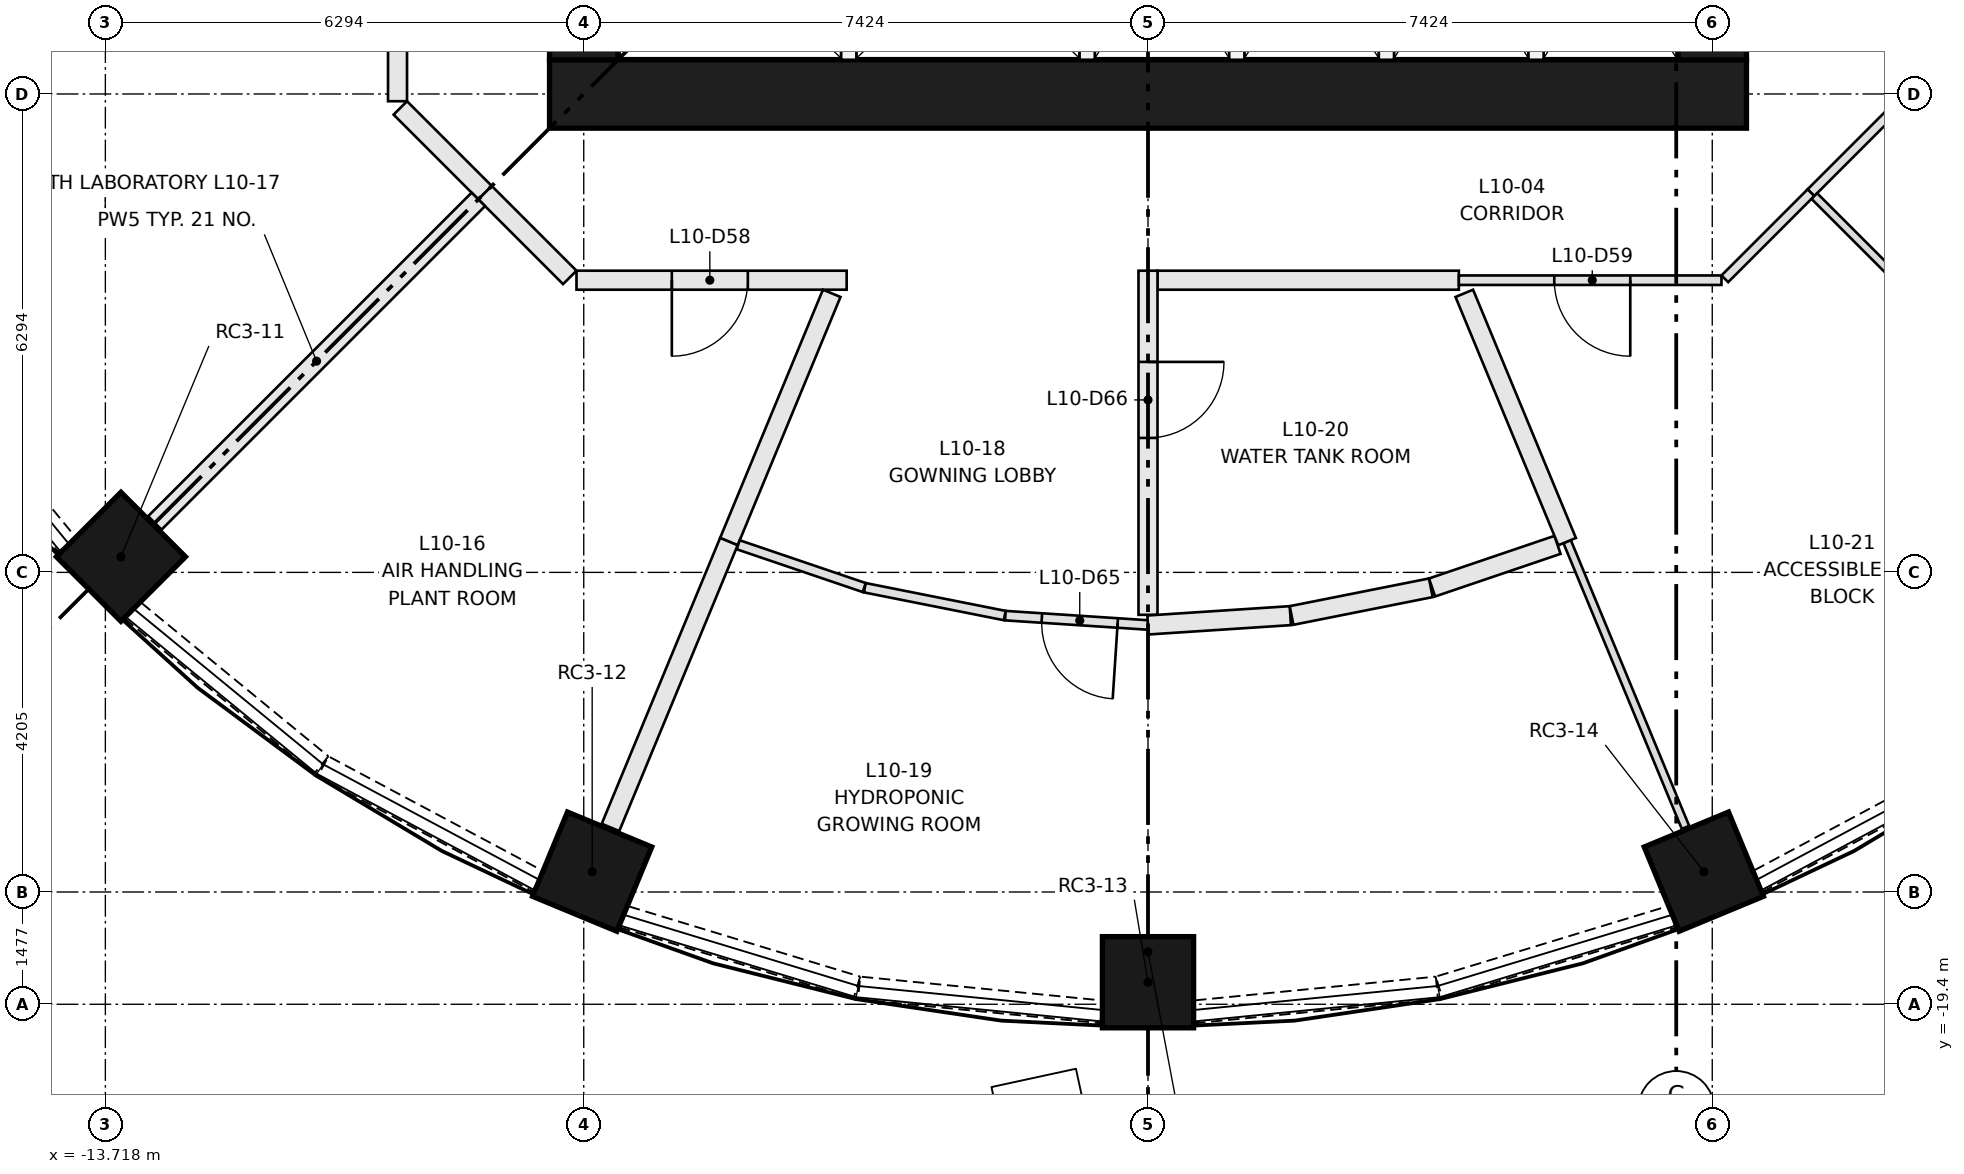
"""IFC4 building model, lengths in metres.
Left out: names, types, materials, properties, quantities, classifications, styles, units other than length and angle.
Written with IfcOpenShell. Run it as: python <this file> out.ifc"""

import sys

from ifc_helpers import new_model, si_unit, direction, frame, frame_2d, origin, origin_2d, place, context, subcontext, project, spatial, rectangle, extrude, element, fill, save


model = new_model("IFC4")
c1 = context("Model", 3, precision=1e-05, world=origin(), true_north=direction((0.0, 1.0)))
c2 = subcontext(c1, "Body", "Model", "MODEL_VIEW")
j1 = project(units=[si_unit("LENGTHUNIT", "METRE"), si_unit("PLANEANGLEUNIT", "RADIAN")], contexts=[c1])
p1 = place(None, origin())
s1 = spatial("IfcSite", under=j1, at=p1, CompositionType="ELEMENT")
p2 = place(p1, origin())
s2 = spatial("IfcBuilding", under=s1, at=p2, CompositionType="ELEMENT")
p3 = place(p2, frame((0.0, 0.0, 40.8)))
s3 = spatial("IfcBuildingStorey", under=s2, at=p3, CompositionType="ELEMENT", Elevation=40.8)
for number, where, z_axis, x_axis in (
    (1, (-13.513, -13.513, 0.0), (0.0, 0.0, 1.0), (-0.707, -0.707, 0.0)),
    (2, (-7.313, -17.655, 0.0), (0.0, 0.0, 1.0), (-0.383, -0.924, 0.0)),
    (3, (0.0, -19.11, 0.0), (0.0, 0.0, 1.0), (0.0, -1.0, 0.0)),
    (4, (7.313, -17.655, 0.0), (0.0, 0.0, 1.0), (0.383, -0.924, 0.0)),
):
    element("IfcColumn", number, at=place(p3, frame(where, z_axis=z_axis, x_axis=x_axis)), inside=s3, PredefinedType="COLUMN", context=c2, shape_type="SweptSolid", body=[
        extrude(rectangle(XDim=1.2, YDim=1.2, at=origin_2d()), origin(), (0.0, 0.0, 1.0), 3.65),
    ])
p4 = place(p3, frame((-7.874, -7.424, 0.0), z_axis=(0.0, 0.0, 1.0), x_axis=(1.0, 0.0, 0.0)))
e5 = element("IfcWall", 5, at=p4, inside=s3, PredefinedType="SHEAR", context=c2, shape_type="SweptSolid", body=[
    extrude(rectangle(XDim=15.748, YDim=0.9, at=frame_2d((7.874, 0.0))), origin(), (0.0, 0.0, 1.0), 3.65),
])
p5 = place(p3, frame((-7.424, -6.974, 0.0), z_axis=(0.0, 0.0, 1.0), x_axis=(0.0, 1.0, 0.0)))
e6 = element("IfcWall", 6, at=p5, inside=s3, PredefinedType="SHEAR", context=c2, shape_type="SweptSolid", body=[
    extrude(rectangle(XDim=13.948, YDim=0.9, at=frame_2d((6.974, 0.0))), origin(), (0.0, 0.0, 1.0), 3.65),
])
p6 = place(p5, frame((6.474, 0.0, 0.0)))
e7 = element("IfcOpeningElement", 7, at=p6, cuts=e6, PredefinedType="OPENING", context=c2, shape_type="SweptSolid", body=[
    extrude(rectangle(XDim=1.0, YDim=2.1, at=frame_2d((0.5, 1.05))), frame((0.0, 0.46, 0.0), z_axis=(0.0, -1.0, 0.0), x_axis=(1.0, 0.0, 0.0)), (0.0, 0.0, 1.0), 0.92),
])
p7 = place(p5, frame((3.35, 0.0, 0.0)))
e8 = element("IfcOpeningElement", 8, at=p7, cuts=e6, PredefinedType="OPENING", context=c2, shape_type="SweptSolid", body=[
    extrude(rectangle(XDim=1.8, YDim=2.1, at=frame_2d((0.9, 1.05))), frame((0.0, 0.46, 0.0), z_axis=(0.0, -1.0, 0.0), x_axis=(1.0, 0.0, 0.0)), (0.0, 0.0, 1.0), 0.92),
])
p8 = place(p5, frame((8.799, 0.0, 0.0)))
e9 = element("IfcOpeningElement", 9, at=p8, cuts=e6, PredefinedType="OPENING", context=c2, shape_type="SweptSolid", body=[
    extrude(rectangle(XDim=1.8, YDim=2.1, at=frame_2d((0.9, 1.05))), frame((0.0, 0.46, 0.0), z_axis=(0.0, -1.0, 0.0), x_axis=(1.0, 0.0, 0.0)), (0.0, 0.0, 1.0), 0.92),
])
p9 = place(p5, frame((11.974, 0.0, 0.0)))
e10 = element("IfcOpeningElement", 10, at=p9, cuts=e6, PredefinedType="OPENING", context=c2, shape_type="SweptSolid", body=[
    extrude(rectangle(XDim=1.0, YDim=2.1, at=frame_2d((0.5, 1.05))), frame((0.0, 0.46, 0.0), z_axis=(0.0, -1.0, 0.0), x_axis=(1.0, 0.0, 0.0)), (0.0, 0.0, 1.0), 0.92),
])
p10 = place(p3, frame((7.424, -6.974, 0.0), z_axis=(0.0, 0.0, 1.0), x_axis=(0.0, 1.0, 0.0)))
e11 = element("IfcWall", 11, at=p10, inside=s3, PredefinedType="SHEAR", context=c2, shape_type="SweptSolid", body=[
    extrude(rectangle(XDim=13.948, YDim=0.9, at=frame_2d((6.974, 0.0))), origin(), (0.0, 0.0, 1.0), 3.65),
])
p11 = place(p10, frame((6.474, 0.0, 0.0)))
e12 = element("IfcOpeningElement", 12, at=p11, cuts=e11, PredefinedType="OPENING", context=c2, shape_type="SweptSolid", body=[
    extrude(rectangle(XDim=1.0, YDim=2.1, at=frame_2d((0.5, 1.05))), frame((0.0, 0.46, 0.0), z_axis=(0.0, -1.0, 0.0), x_axis=(1.0, 0.0, 0.0)), (0.0, 0.0, 1.0), 0.92),
])
p12 = place(p10, frame((3.35, 0.0, 0.0)))
e13 = element("IfcOpeningElement", 13, at=p12, cuts=e11, PredefinedType="OPENING", context=c2, shape_type="SweptSolid", body=[
    extrude(rectangle(XDim=1.8, YDim=2.1, at=frame_2d((0.9, 1.05))), frame((0.0, 0.46, 0.0), z_axis=(0.0, -1.0, 0.0), x_axis=(1.0, 0.0, 0.0)), (0.0, 0.0, 1.0), 0.92),
])
p13 = place(p10, frame((8.799, 0.0, 0.0)))
e14 = element("IfcOpeningElement", 14, at=p13, cuts=e11, PredefinedType="OPENING", context=c2, shape_type="SweptSolid", body=[
    extrude(rectangle(XDim=1.8, YDim=2.1, at=frame_2d((0.9, 1.05))), frame((0.0, 0.46, 0.0), z_axis=(0.0, -1.0, 0.0), x_axis=(1.0, 0.0, 0.0)), (0.0, 0.0, 1.0), 0.92),
])
for number, where, z_axis, x_axis in (
    (15, (-3.937, -6.974, 0.0), (0.0, 0.0, 1.0), (0.0, 1.0, 0.0)),
    (16, (-0.8, -6.974, 0.0), (0.0, 0.0, 1.0), (0.0, 1.0, 0.0)),
    (17, (1.168, -6.974, 0.0), (0.0, 0.0, 1.0), (0.0, 1.0, 0.0)),
    (18, (3.137, -6.974, 0.0), (0.0, 0.0, 1.0), (0.0, 1.0, 0.0)),
    (19, (5.105, -6.974, 0.0), (0.0, 0.0, 1.0), (0.0, 1.0, 0.0)),
):
    element("IfcWall", number, at=place(p3, frame(where, z_axis=z_axis, x_axis=x_axis)), inside=s3, PredefinedType="PARTITIONING", context=c2, shape_type="SweptSolid", body=[
        extrude(rectangle(XDim=2.8, YDim=0.2, at=frame_2d((1.4, 0.0))), origin(), (0.0, 0.0, 1.0), 3.3),
    ])
for number, where, z_axis, x_axis in (
    (20, (-16.253, -10.879, 0.0), (0.0, 0.0, 1.0), (0.634, -0.773, 0.0)),
    (21, (-13.354, -14.222, 0.0), (0.0, 0.0, 1.0), (0.773, -0.634, 0.0)),
):
    element("IfcWall", number, at=place(p3, frame(where, z_axis=z_axis, x_axis=x_axis)), inside=s3, PredefinedType="SOLIDWALL", context=c2, shape_type="SweptSolid", body=[
        extrude(rectangle(XDim=3.202, YDim=0.3, at=frame_2d((1.601, 0.0))), origin(), (0.0, 0.0, 1.0), 0.9),
    ])
p14 = place(p3, frame((-10.854, -16.27, 0.0), z_axis=(0.0, 0.0, 1.0), x_axis=(0.881981372243, -0.471284265614, 0.0)))
e22 = element("IfcWall", 22, at=p14, inside=s3, PredefinedType="SOLIDWALL", context=c2, shape_type="SweptSolid", body=[
    extrude(rectangle(XDim=3.204, YDim=0.3, at=frame_2d((1.602, 0.0))), origin(), (0.0, 0.0, 1.0), 0.9),
])
p15 = place(p3, frame((-6.895, -18.25, 0.0), z_axis=(0.0, 0.0, 1.0), x_axis=(0.956883225512, -0.290472877795, 0.0)))
e23 = element("IfcWall", 23, at=p15, inside=s3, PredefinedType="SOLIDWALL", context=c2, shape_type="SweptSolid", body=[
    extrude(rectangle(XDim=3.202, YDim=0.3, at=frame_2d((1.601, 0.0))), origin(), (0.0, 0.0, 1.0), 0.9),
])
for number, where, z_axis, x_axis in (
    (24, (-3.801, -19.186, 0.0), (0.0, 0.0, 1.0), (0.995, -0.098, 0.0)),
    (25, (0.613, -19.5, 0.0), (0.0, 0.0, 1.0), (0.995, 0.098, 0.0)),
):
    element("IfcWall", number, at=place(p3, frame(where, z_axis=z_axis, x_axis=x_axis)), inside=s3, PredefinedType="SOLIDWALL", context=c2, shape_type="SweptSolid", body=[
        extrude(rectangle(XDim=3.204, YDim=0.3, at=frame_2d((1.602, 0.0))), origin(), (0.0, 0.0, 1.0), 0.9),
    ])
p16 = place(p3, frame((3.83, -19.18, 0.0), z_axis=(0.0, 0.0, 1.0), x_axis=(0.956883225512, 0.290472877795, 0.0)))
e26 = element("IfcWall", 26, at=p16, inside=s3, PredefinedType="SOLIDWALL", context=c2, shape_type="SweptSolid", body=[
    extrude(rectangle(XDim=3.202, YDim=0.3, at=frame_2d((1.601, 0.0))), origin(), (0.0, 0.0, 1.0), 0.9),
])
p17 = place(p3, frame((8.028, -17.78, 0.0), z_axis=(0.0, 0.0, 1.0), x_axis=(0.881981372243, 0.471284265614, 0.0)))
e27 = element("IfcWall", 27, at=p17, inside=s3, PredefinedType="SOLIDWALL", context=c2, shape_type="SweptSolid", body=[
    extrude(rectangle(XDim=3.204, YDim=0.3, at=frame_2d((1.602, 0.0))), origin(), (0.0, 0.0, 1.0), 0.9),
])
p18 = place(p3, frame((9.856, -7.589, 0.0), z_axis=(0.0, 0.0, 1.0), x_axis=(-0.70718294931, -0.707030604857, 0.0)))
e28 = element("IfcWall", 28, at=p18, inside=s3, PredefinedType="PARTITIONING", context=c2, shape_type="SweptSolid", body=[
    extrude(rectangle(XDim=1.603, YDim=0.125, at=frame_2d((0.801, 0.0))), origin(), (0.0, 0.0, 1.0), 3.3),
])
p19 = place(p3, frame((-9.874, -7.519, 0.0), z_axis=(0.0, 0.0, 1.0), x_axis=(0.0, 1.0, 0.0)))
e29 = element("IfcWall", 29, at=p19, inside=s3, PredefinedType="PARTITIONING", context=c2, shape_type="SweptSolid", body=[
    extrude(rectangle(XDim=3.429, YDim=0.25, at=frame_2d((1.715, 0.0))), origin(), (0.0, 0.0, 1.0), 3.3),
])
p20 = place(p19, frame((1.2, 0.0, 0.0)))
e30 = element("IfcOpeningElement", 30, at=p20, cuts=e29, PredefinedType="OPENING", context=c2, shape_type="SweptSolid", body=[
    extrude(rectangle(XDim=1.0, YDim=2.1, at=frame_2d((0.5, 1.05))), frame((0.0, 0.135, 0.0), z_axis=(0.0, -1.0, 0.0), x_axis=(1.0, 0.0, 0.0)), (0.0, 0.0, 1.0), 0.27),
])
for number, where, z_axis, x_axis in (
    (31, (-8.722, -8.722, 0.0), (0.0, 0.0, 1.0), (-0.707, 0.707, 0.0)),
    (32, (-7.608, -9.837, 0.0), (0.0, 0.0, 1.0), (-0.707, 0.707, 0.0)),
):
    element("IfcWall", number, at=place(p3, frame(where, z_axis=z_axis, x_axis=x_axis)), inside=s3, PredefinedType="PARTITIONING", context=c2, shape_type="SweptSolid", body=[
        extrude(rectangle(XDim=1.577, YDim=0.25, at=frame_2d((0.788, 0.0))), origin(), (0.0, 0.0, 1.0), 3.3),
    ])
p21 = place(p3, frame((-3.965, -9.874, 0.0), z_axis=(0.0, 0.0, 1.0), x_axis=(-1.0, 0.0, 0.0)))
e33 = element("IfcWall", 33, at=p21, inside=s3, PredefinedType="PARTITIONING", context=c2, shape_type="SweptSolid", body=[
    extrude(rectangle(XDim=3.554, YDim=0.25, at=frame_2d((1.777, 0.0))), origin(), (0.0, 0.0, 1.0), 3.3),
])
p22 = place(p21, frame((1.3, 0.0, 0.0)))
e34 = element("IfcOpeningElement", 34, at=p22, cuts=e33, PredefinedType="OPENING", context=c2, shape_type="SweptSolid", body=[
    extrude(rectangle(XDim=1.0, YDim=2.1, at=frame_2d((0.5, 1.05))), frame((0.0, 0.135, 0.0), z_axis=(0.0, -1.0, 0.0), x_axis=(1.0, 0.0, 0.0)), (0.0, 0.0, 1.0), 0.27),
])
p23 = place(p3, frame((4.09, -9.874, 0.0), z_axis=(0.0, 0.0, 1.0), x_axis=(-1.0, 0.0, 0.0)))
e35 = element("IfcWall", 35, at=p23, inside=s3, PredefinedType="PARTITIONING", context=c2, shape_type="SweptSolid", body=[
    extrude(rectangle(XDim=3.965, YDim=0.25, at=frame_2d((1.982, 0.0))), origin(), (0.0, 0.0, 1.0), 3.3),
])
p24 = place(p3, frame((7.545, -9.874, 0.0), z_axis=(0.0, 0.0, 1.0), x_axis=(-1.0, 0.0, 0.0)))
e36 = element("IfcWall", 36, at=p24, inside=s3, PredefinedType="PARTITIONING", context=c2, shape_type="SweptSolid", body=[
    extrude(rectangle(XDim=3.455, YDim=0.125, at=frame_2d((1.728, 0.0))), origin(), (0.0, 0.0, 1.0), 3.3),
])
p25 = place(p24, frame((1.2, 0.0, 0.0)))
e37 = element("IfcOpeningElement", 37, at=p25, cuts=e36, PredefinedType="OPENING", context=c2, shape_type="SweptSolid", body=[
    extrude(rectangle(XDim=1.0, YDim=2.1, at=frame_2d((0.5, 1.05))), frame((0.0, 0.073, 0.0), z_axis=(0.0, -1.0, 0.0), x_axis=(1.0, 0.0, 0.0)), (0.0, 0.0, 1.0), 0.145),
])
p26 = place(p3, frame((8.722, -8.722, 0.0), z_axis=(0.0, 0.0, 1.0), x_axis=(-0.707030604857, -0.70718294931, 0.0)))
e38 = element("IfcWall", 38, at=p26, inside=s3, PredefinedType="PARTITIONING", context=c2, shape_type="SweptSolid", body=[
    extrude(rectangle(XDim=1.603, YDim=0.125, at=frame_2d((0.801, 0.0))), origin(), (0.0, 0.0, 1.0), 3.3),
])
p27 = place(p3, frame((-13.313, -5.514, 0.0), z_axis=(0.0, 0.0, 1.0), x_axis=(-0.923873536763, -0.382697907061, 0.0)))
e39 = element("IfcWall", 39, at=p27, inside=s3, PredefinedType="PARTITIONING", context=c2, shape_type="SweptSolid", body=[
    extrude(rectangle(XDim=4.07, YDim=0.25, at=frame_2d((2.035, 0.0))), origin(), (0.0, 0.0, 1.0), 3.3),
])
p28 = place(p3, frame((-13.067, -13.067, 0.0), z_axis=(0.0, 0.0, 1.0), x_axis=(0.707106781187, 0.707106781187, 0.0)))
e40 = element("IfcWall", 40, at=p28, inside=s3, PredefinedType="PARTITIONING", context=c2, shape_type="SweptSolid", body=[
    extrude(rectangle(XDim=6.02, YDim=0.25, at=frame_2d((3.01, 0.0))), origin(), (0.0, 0.0, 1.0), 3.3),
])
p29 = place(p3, frame((-4.162, -10.047, 0.0), z_axis=(0.0, 0.0, 1.0), x_axis=(-0.382662857696, -0.92388805455, 0.0)))
e41 = element("IfcWall", 41, at=p29, inside=s3, PredefinedType="PARTITIONING", context=c2, shape_type="SweptSolid", body=[
    extrude(rectangle(XDim=3.535, YDim=0.25, at=frame_2d((1.768, 0.0))), origin(), (0.0, 0.0, 1.0), 3.3),
])
p30 = place(p3, frame((-5.514, -13.313, 0.0), z_axis=(0.0, 0.0, 1.0), x_axis=(-0.382697907061, -0.923873536763, 0.0)))
e42 = element("IfcWall", 42, at=p30, inside=s3, PredefinedType="PARTITIONING", context=c2, shape_type="SweptSolid", body=[
    extrude(rectangle(XDim=4.07, YDim=0.25, at=frame_2d((2.035, 0.0))), origin(), (0.0, 0.0, 1.0), 3.3),
])
p31 = place(p3, frame((-3.733, -13.918, 0.0), z_axis=(0.0, 0.0, 1.0), x_axis=(-0.946926428718, 0.321450367234, 0.0)))
e43 = element("IfcWall", 43, at=p31, inside=s3, PredefinedType="PARTITIONING", context=c2, shape_type="SweptSolid", body=[
    extrude(rectangle(XDim=1.751, YDim=0.125, at=frame_2d((0.876, 0.0))), origin(), (0.0, 0.0, 1.0), 3.3),
])
p32 = place(p3, frame((-1.885, -14.286, 0.0), z_axis=(0.0, 0.0, 1.0), x_axis=(-0.980800221705, 0.19501519198, 0.0)))
e44 = element("IfcWall", 44, at=p32, inside=s3, PredefinedType="PARTITIONING", context=c2, shape_type="SweptSolid", body=[
    extrude(rectangle(XDim=1.877, YDim=0.125, at=frame_2d((0.938, 0.0))), origin(), (0.0, 0.0, 1.0), 3.3),
])
p33 = place(p3, frame((0.0, -14.41, 0.0), z_axis=(0.0, 0.0, 1.0), x_axis=(-0.997865971163, 0.065295509756, 0.0)))
e45 = element("IfcWall", 45, at=p33, inside=s3, PredefinedType="PARTITIONING", context=c2, shape_type="SweptSolid", body=[
    extrude(rectangle(XDim=1.881, YDim=0.125, at=frame_2d((0.94, 0.0))), origin(), (0.0, 0.0, 1.0), 3.3),
])
p34 = place(p33, frame((0.4, 0.0, 0.0)))
e46 = element("IfcOpeningElement", 46, at=p34, cuts=e45, PredefinedType="OPENING", context=c2, shape_type="SweptSolid", body=[
    extrude(rectangle(XDim=1.0, YDim=2.1, at=frame_2d((0.5, 1.05))), frame((0.0, 0.073, 0.0), z_axis=(0.0, -1.0, 0.0), x_axis=(1.0, 0.0, 0.0)), (0.0, 0.0, 1.0), 0.145),
])
p35 = place(p3, frame((0.0, -9.749, 0.0), z_axis=(0.0, 0.0, 1.0), x_axis=(0.0, -1.0, 0.0)))
e47 = element("IfcWall", 47, at=p35, inside=s3, PredefinedType="PARTITIONING", context=c2, shape_type="SweptSolid", body=[
    extrude(rectangle(XDim=4.528, YDim=0.25, at=frame_2d((2.264, 0.0))), origin(), (0.0, 0.0, 1.0), 3.3),
])
p36 = place(p35, frame((1.2, 0.0, 0.0)))
e48 = element("IfcOpeningElement", 48, at=p36, cuts=e47, PredefinedType="OPENING", context=c2, shape_type="SweptSolid", body=[
    extrude(rectangle(XDim=1.0, YDim=2.1, at=frame_2d((0.5, 1.05))), frame((0.0, 0.135, 0.0), z_axis=(0.0, -1.0, 0.0), x_axis=(1.0, 0.0, 0.0)), (0.0, 0.0, 1.0), 0.27),
])
p37 = place(p3, frame((0.0, -14.41, 0.0), z_axis=(0.0, 0.0, 1.0), x_axis=(0.997857088285, 0.065431119203, 0.0)))
e49 = element("IfcWall", 49, at=p37, inside=s3, PredefinedType="PARTITIONING", context=c2, shape_type="SweptSolid", body=[
    extrude(rectangle(XDim=1.877, YDim=0.25, at=frame_2d((0.938, 0.0))), origin(), (0.0, 0.0, 1.0), 3.3),
])
p38 = place(p3, frame((1.889, -14.285, 0.0), z_axis=(0.0, 0.0, 1.0), x_axis=(0.980791158232, 0.195060769847, 0.0)))
e50 = element("IfcWall", 50, at=p38, inside=s3, PredefinedType="PARTITIONING", context=c2, shape_type="SweptSolid", body=[
    extrude(rectangle(XDim=1.869, YDim=0.25, at=frame_2d((0.934, 0.0))), origin(), (0.0, 0.0, 1.0), 3.3),
])
p39 = place(p3, frame((3.737, -13.917, 0.0), z_axis=(0.0, 0.0, 1.0), x_axis=(0.946889634804, 0.321558734138, 0.0)))
e51 = element("IfcWall", 51, at=p39, inside=s3, PredefinedType="PARTITIONING", context=c2, shape_type="SweptSolid", body=[
    extrude(rectangle(XDim=1.743, YDim=0.25, at=frame_2d((0.872, 0.0))), origin(), (0.0, 0.0, 1.0), 3.3),
])
p40 = place(p3, frame((5.514, -13.313, 0.0), z_axis=(0.0, 0.0, 1.0), x_axis=(0.382697907061, -0.923873536763, 0.0)))
e52 = element("IfcWall", 52, at=p40, inside=s3, PredefinedType="PARTITIONING", context=c2, shape_type="SweptSolid", body=[
    extrude(rectangle(XDim=4.07, YDim=0.105, at=frame_2d((2.035, 0.0))), origin(), (0.0, 0.0, 1.0), 3.3),
])
p41 = place(p3, frame((4.162, -10.047, 0.0), z_axis=(0.0, 0.0, 1.0), x_axis=(0.382662857696, -0.92388805455, 0.0)))
e53 = element("IfcWall", 53, at=p41, inside=s3, PredefinedType="PARTITIONING", context=c2, shape_type="SweptSolid", body=[
    extrude(rectangle(XDim=3.535, YDim=0.25, at=frame_2d((1.768, 0.0))), origin(), (0.0, 0.0, 1.0), 3.3),
])
p42 = place(p3, frame((8.767, -8.767, 0.0), z_axis=(0.0, 0.0, 1.0), x_axis=(0.707106781187, -0.707106781187, 0.0)))
e54 = element("IfcWall", 54, at=p42, inside=s3, PredefinedType="PARTITIONING", context=c2, shape_type="SweptSolid", body=[
    extrude(rectangle(XDim=6.082, YDim=0.105, at=frame_2d((3.041, 0.0))), origin(), (0.0, 0.0, 1.0), 3.3),
])
p43 = place(p22, origin())
e55 = element("IfcDoor", 55, at=p43, inside=s3, OperationType="SINGLE_SWING_RIGHT", PredefinedType="DOOR", context=c2, shape_type="SweptSolid", body=[
    extrude(rectangle(XDim=1.0, YDim=2.1, at=frame_2d((0.5, 1.05))), frame((0.0, 0.025, 0.0), z_axis=(0.0, -1.0, 0.0), x_axis=(1.0, 0.0, 0.0)), (0.0, 0.0, 1.0), 0.05),
])
fill(e34, e55)
p44 = place(p25, origin())
e56 = element("IfcDoor", 56, at=p44, inside=s3, OperationType="SINGLE_SWING_LEFT", PredefinedType="DOOR", context=c2, shape_type="SweptSolid", body=[
    extrude(rectangle(XDim=1.0, YDim=2.1, at=frame_2d((0.5, 1.05))), frame((0.0, 0.025, 0.0), z_axis=(0.0, -1.0, 0.0), x_axis=(1.0, 0.0, 0.0)), (0.0, 0.0, 1.0), 0.05),
])
fill(e37, e56)
p45 = place(p34, origin())
e57 = element("IfcDoor", 57, at=p45, inside=s3, OperationType="SINGLE_SWING_LEFT", PredefinedType="DOOR", context=c2, shape_type="SweptSolid", body=[
    extrude(rectangle(XDim=1.0, YDim=2.1, at=frame_2d((0.5, 1.05))), frame((0.0, 0.025, 0.0), z_axis=(0.0, -1.0, 0.0), x_axis=(1.0, 0.0, 0.0)), (0.0, 0.0, 1.0), 0.05),
])
fill(e46, e57)
p46 = place(p36, origin())
e58 = element("IfcDoor", 58, at=p46, inside=s3, OperationType="SINGLE_SWING_LEFT", PredefinedType="DOOR", context=c2, shape_type="SweptSolid", body=[
    extrude(rectangle(XDim=1.0, YDim=2.1, at=frame_2d((0.5, 1.05))), frame((0.0, 0.025, 0.0), z_axis=(0.0, -1.0, 0.0), x_axis=(1.0, 0.0, 0.0)), (0.0, 0.0, 1.0), 0.05),
])
fill(e48, e58)
save(model, sys.argv[1])
